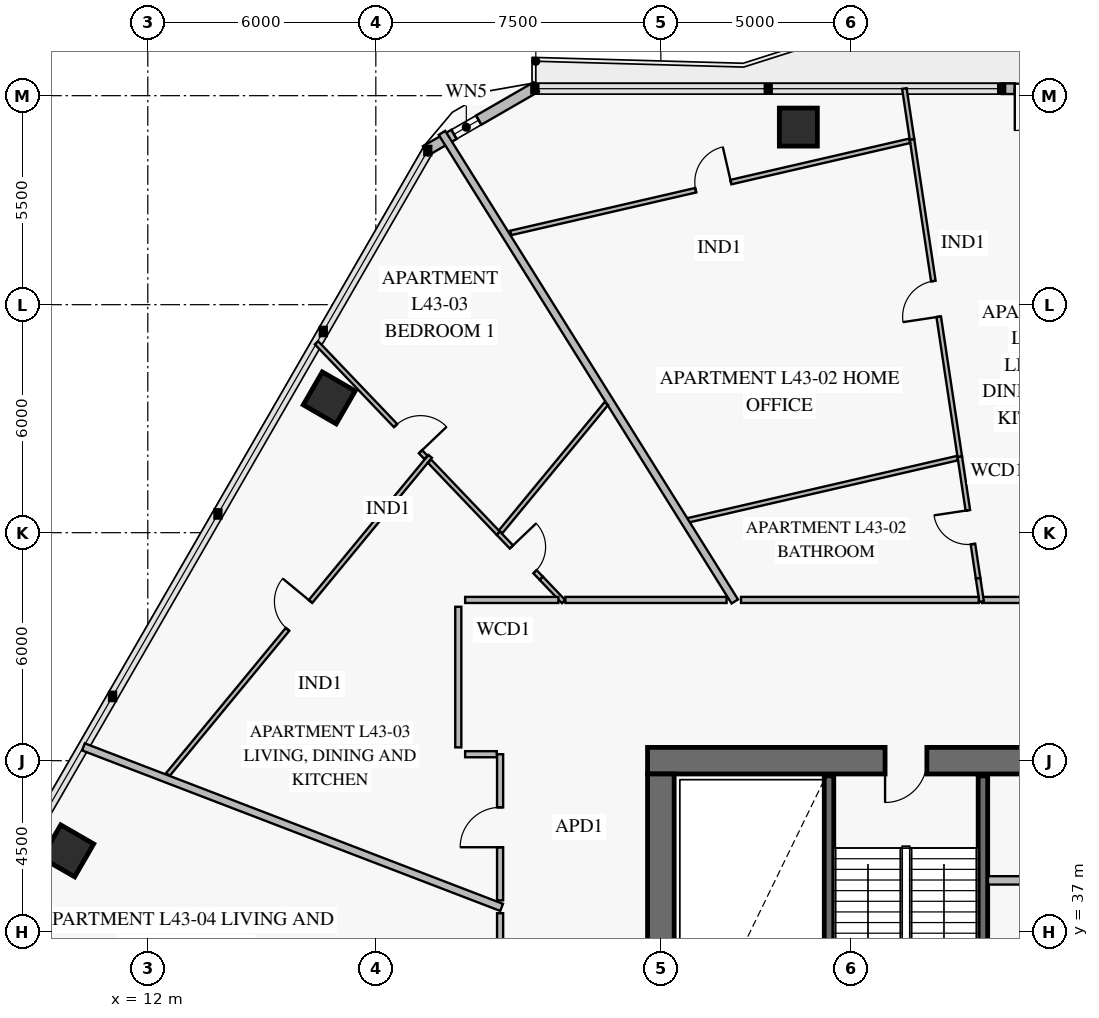
"""IFC4 building model, lengths in metres.
Left out: names, types, materials, properties, quantities, classifications, styles, units other than length and angle.
Written with IfcOpenShell. Run it as: python <this file> out.ifc"""

import sys

from ifc_helpers import new_model, si_unit, direction, frame, frame_2d, origin, origin_2d, place, context, subcontext, project, spatial, rectangle, extrude, element, fill, save


model = new_model("IFC4")
c1 = context("Model", 3, precision=1e-05, world=origin(), true_north=direction((0.0, 1.0)))
c2 = subcontext(c1, "Body", "Model", "MODEL_VIEW")
j1 = project(units=[si_unit("LENGTHUNIT", "METRE"), si_unit("PLANEANGLEUNIT", "RADIAN")], contexts=[c1])
p1 = place(None, origin())
s1 = spatial("IfcSite", under=j1, at=p1, CompositionType="ELEMENT")
p2 = place(p1, origin())
s2 = spatial("IfcBuilding", under=s1, at=p2, CompositionType="ELEMENT")
p3 = place(p2, frame((0.0, 0.0, 173.2)))
s3 = spatial("IfcBuildingStorey", under=s2, at=p3, CompositionType="ELEMENT", Elevation=173.2)
p4 = place(p3, frame((36.75, 41.5, 0.0), z_axis=(0.0, 0.0, 1.0), x_axis=(-1.0, 0.0, 0.0)))
e1 = element("IfcWall", 1, at=p4, inside=s3, PredefinedType="SHEAR", context=c2, shape_type="SweptSolid", body=[
    extrude(rectangle(XDim=11.6, YDim=0.7, at=frame_2d((5.8, 0.0))), origin(), (0.0, 0.0, 1.0), 3.8),
])
p5 = place(p4, frame((4.25, 0.0, 0.0)))
e2 = element("IfcOpeningElement", 2, at=p5, cuts=e1, PredefinedType="OPENING", context=c2, shape_type="SweptSolid", body=[
    extrude(rectangle(XDim=1.1, YDim=2.15, at=frame_2d((0.55, 1.075))), frame((0.0, 0.362, 0.0), z_axis=(0.0, -1.0, 0.0), x_axis=(1.0, 0.0, 0.0)), (0.0, 0.0, 1.0), 0.724),
])
p6 = place(p3, frame((25.5, 22.85, 0.0), z_axis=(0.0, 0.0, 1.0), x_axis=(0.0, 1.0, 0.0)))
e3 = element("IfcWall", 3, at=p6, inside=s3, PredefinedType="SHEAR", context=c2, shape_type="SweptSolid", body=[
    extrude(rectangle(XDim=18.3, YDim=0.7, at=frame_2d((9.15, 0.0))), origin(), (0.0, 0.0, 1.0), 3.8),
])
p7 = place(p6, frame((8.9, 0.0, 0.0)))
e4 = element("IfcOpeningElement", 4, at=p7, cuts=e3, PredefinedType="OPENING", context=c2, shape_type="SweptSolid", body=[
    extrude(rectangle(XDim=1.1, YDim=2.15, at=frame_2d((0.55, 1.075))), frame((0.0, 0.362, 0.0), z_axis=(0.0, -1.0, 0.0), x_axis=(1.0, 0.0, 0.0)), (0.0, 0.0, 1.0), 0.724),
])
for number, where, z_axis, x_axis in (
    (5, (29.118, 58.173, 0.0), (0.0, 0.0, 1.0), (-1.0, 0.0, 0.0)),
    (6, (16.774, 51.047, 0.0), (0.0, 0.0, 1.0), (-0.5, -0.866, 0.0)),
    (7, (9.892, 39.126, 0.0), (0.0, 0.0, 1.0), (-0.5, -0.866, 0.0)),
):
    element("IfcColumn", number, at=place(p3, frame(where, z_axis=z_axis, x_axis=x_axis)), inside=s3, PredefinedType="COLUMN", context=c2, shape_type="SweptSolid", body=[
        extrude(rectangle(XDim=1.0, YDim=1.0, at=origin_2d()), origin(), (0.0, 0.0, 1.0), 3.55),
    ])
p8 = place(p3, frame((19.307, 57.548, 0.0), z_axis=(0.0, 0.0, 1.0), x_axis=(0.866020068361, 0.500009241111, 0.0)))
e8 = element("IfcWall", 8, at=p8, inside=s3, PredefinedType="SOLIDWALL", context=c2, shape_type="SweptSolid", body=[
    extrude(rectangle(XDim=3.365, YDim=0.28, at=frame_2d((1.683, 0.0))), origin(), (0.0, 0.0, 1.0), 3.55),
])
p9 = place(p8, frame((0.866, 0.0, 0.85)))
e9 = element("IfcOpeningElement", 9, at=p9, cuts=e8, PredefinedType="OPENING", context=c2, shape_type="SweptSolid", body=[
    extrude(rectangle(XDim=0.75, YDim=1.5, at=frame_2d((0.375, 0.75))), frame((0.0, 0.152, 0.0), z_axis=(0.0, -1.0, 0.0), x_axis=(1.0, 0.0, 0.0)), (0.0, 0.0, 1.0), 0.304),
])
p10 = place(p3, frame((34.468, 59.183, 0.0), z_axis=(0.0, 0.0, 1.0), x_axis=(1.0, 0.0, 0.0)))
e10 = element("IfcWall", 10, at=p10, inside=s3, PredefinedType="SOLIDWALL", context=c2, shape_type="SweptSolid", body=[
    extrude(rectangle(XDim=1.79, YDim=0.28, at=frame_2d((0.895, 0.0))), origin(), (0.0, 0.0, 1.0), 3.55),
])
p11 = place(p10, frame((0.345, 0.0, 0.0)))
e11 = element("IfcOpeningElement", 11, at=p11, cuts=e10, PredefinedType="OPENING", context=c2, shape_type="SweptSolid", body=[
    extrude(rectangle(XDim=1.1, YDim=2.2, at=frame_2d((0.55, 1.1))), frame((0.0, 0.152, 0.0), z_axis=(0.0, -1.0, 0.0), x_axis=(1.0, 0.0, 0.0)), (0.0, 0.0, 1.0), 0.304),
])
for number, where, z_axis, x_axis in (
    (12, (29.925, 31.4, 0.0), (0.0, 0.0, 1.0), (0.0, 1.0, 0.0)),
    (13, (33.975, 31.4, 0.0), (0.0, 0.0, 1.0), (0.0, 1.0, 0.0)),
):
    element("IfcWall", number, at=place(p3, frame(where, z_axis=z_axis, x_axis=x_axis)), inside=s3, PredefinedType="SOLIDWALL", context=c2, shape_type="SweptSolid", body=[
        extrude(rectangle(XDim=9.7, YDim=0.25, at=frame_2d((4.85, 0.0))), origin(), (0.0, 0.0, 1.0), 3.8),
    ])
p12 = place(p3, frame((33.848, 46.3, 0.0), z_axis=(0.0, 0.0, 1.0), x_axis=(-0.148934116093, 0.988847121179, 0.0)))
e14 = element("IfcWall", 14, at=p12, inside=s3, PredefinedType="PARTITIONING", context=c2, shape_type="SweptSolid", body=[
    extrude(rectangle(XDim=3.238, YDim=0.12, at=frame_2d((1.619, 0.0))), origin(), (0.0, 0.0, 1.0), 3.55),
])
p13 = place(p12, frame((0.91, 0.0, 0.0)))
e15 = element("IfcOpeningElement", 15, at=p13, cuts=e14, PredefinedType="OPENING", context=c2, shape_type="SweptSolid", body=[
    extrude(rectangle(XDim=0.9, YDim=2.1, at=frame_2d((0.45, 1.05))), frame((0.0, 0.072, 0.0), z_axis=(0.0, -1.0, 0.0), x_axis=(1.0, 0.0, 0.0)), (0.0, 0.0, 1.0), 0.144),
])
p14 = place(p3, frame((33.365, 49.501, 0.0), z_axis=(0.0, 0.0, 1.0), x_axis=(-0.148816904755, 0.988864767731, 0.0)))
e16 = element("IfcWall", 16, at=p14, inside=s3, PredefinedType="PARTITIONING", context=c2, shape_type="SweptSolid", body=[
    extrude(rectangle(XDim=8.444, YDim=0.12, at=frame_2d((4.222, 0.0))), origin(), (0.0, 0.0, 1.0), 3.15),
])
p15 = place(p14, frame((3.722, 0.0, 0.0)))
e17 = element("IfcOpeningElement", 17, at=p15, cuts=e16, PredefinedType="OPENING", context=c2, shape_type="SweptSolid", body=[
    extrude(rectangle(XDim=0.95, YDim=2.1, at=frame_2d((0.475, 1.05))), frame((0.0, 0.072, 0.0), z_axis=(0.0, -1.0, 0.0), x_axis=(1.0, 0.0, 0.0)), (0.0, 0.0, 1.0), 0.144),
])
p16 = place(p3, frame((32.046, 57.811, 0.0), z_axis=(0.0, 0.0, 1.0), x_axis=(-0.974371328586, -0.22494558015, 0.0)))
e18 = element("IfcWall", 18, at=p16, inside=s3, PredefinedType="PARTITIONING", context=c2, shape_type="SweptSolid", body=[
    extrude(rectangle(XDim=10.772, YDim=0.12, at=frame_2d((5.386, 0.0))), origin(), (0.0, 0.0, 1.0), 2.87),
])
p17 = place(p16, frame((4.826, 0.0, 0.0)))
e19 = element("IfcOpeningElement", 19, at=p17, cuts=e18, PredefinedType="OPENING", context=c2, shape_type="SweptSolid", body=[
    extrude(rectangle(XDim=0.95, YDim=2.1, at=frame_2d((0.475, 1.05))), frame((0.0, 0.072, 0.0), z_axis=(0.0, -1.0, 0.0), x_axis=(1.0, 0.0, 0.0)), (0.0, 0.0, 1.0), 0.144),
])
p18 = place(p3, frame((37.302, 45.73, 0.0), z_axis=(0.0, 0.0, 1.0), x_axis=(-1.0, 0.0, 0.0)))
e20 = element("IfcWall", 20, at=p18, inside=s3, PredefinedType="PARTITIONING", context=c2, shape_type="SweptSolid", body=[
    extrude(rectangle(XDim=3.348, YDim=0.16, at=frame_2d((1.674, 0.0))), origin(), (0.0, 0.0, 1.0), 3.55),
])
p19 = place(p18, frame((1.149, 0.0, 0.0)))
e21 = element("IfcOpeningElement", 21, at=p19, cuts=e20, PredefinedType="OPENING", context=c2, shape_type="SweptSolid", body=[
    extrude(rectangle(XDim=1.05, YDim=2.15, at=frame_2d((0.525, 1.075))), frame((0.0, 0.092, 0.0), z_axis=(0.0, -1.0, 0.0), x_axis=(1.0, 0.0, 0.0)), (0.0, 0.0, 1.0), 0.184),
])
p20 = place(p3, frame((19.43, 49.509, 0.0), z_axis=(0.0, 0.0, 1.0), x_axis=(-0.636077930037, -0.771624822643, 0.0)))
e22 = element("IfcWall", 22, at=p20, inside=s3, PredefinedType="PARTITIONING", context=c2, shape_type="SweptSolid", body=[
    extrude(rectangle(XDim=10.848, YDim=0.12, at=frame_2d((5.424, 0.0))), origin(), (0.0, 0.0, 1.0), 2.9),
])
p21 = place(p20, frame((4.949, 0.0, 0.0)))
e23 = element("IfcOpeningElement", 23, at=p21, cuts=e22, PredefinedType="OPENING", context=c2, shape_type="SweptSolid", body=[
    extrude(rectangle(XDim=0.95, YDim=2.1, at=frame_2d((0.475, 1.05))), frame((0.0, 0.072, 0.0), z_axis=(0.0, -1.0, 0.0), x_axis=(1.0, 0.0, 0.0)), (0.0, 0.0, 1.0), 0.144),
])
p22 = place(p3, frame((22.354, 46.3, 0.0), z_axis=(0.0, 0.0, 1.0), x_axis=(-0.690394331583, 0.723433249801, 0.0)))
e24 = element("IfcWall", 24, at=p22, inside=s3, PredefinedType="PARTITIONING", context=c2, shape_type="SweptSolid", body=[
    extrude(rectangle(XDim=1.64, YDim=0.12, at=frame_2d((0.82, 0.0))), origin(), (0.0, 0.0, 1.0), 3.55),
])
p23 = place(p22, frame((0.239, 0.0, 0.0)))
e25 = element("IfcOpeningElement", 25, at=p23, cuts=e24, PredefinedType="OPENING", context=c2, shape_type="SweptSolid", body=[
    extrude(rectangle(XDim=0.9, YDim=2.1, at=frame_2d((0.45, 1.05))), frame((0.0, 0.072, 0.0), z_axis=(0.0, -1.0, 0.0), x_axis=(1.0, 0.0, 0.0)), (0.0, 0.0, 1.0), 0.144),
])
p24 = place(p3, frame((21.221, 47.487, 0.0), z_axis=(0.0, 0.0, 1.0), x_axis=(-0.690367102985, 0.723459233901, 0.0)))
e26 = element("IfcWall", 26, at=p24, inside=s3, PredefinedType="PARTITIONING", context=c2, shape_type="SweptSolid", body=[
    extrude(rectangle(XDim=2.619, YDim=0.12, at=frame_2d((1.31, 0.0))), origin(), (0.0, 0.0, 1.0), 3.55),
])
p25 = place(p3, frame((19.319, 49.481, 0.0), z_axis=(0.0, 0.0, 1.0), x_axis=(-0.690401934282, 0.723425994238, 0.0)))
e27 = element("IfcWall", 27, at=p25, inside=s3, PredefinedType="PARTITIONING", context=c2, shape_type="SweptSolid", body=[
    extrude(rectangle(XDim=4.169, YDim=0.12, at=frame_2d((2.085, 0.0))), origin(), (0.0, 0.0, 1.0), 2.87),
])
p26 = place(p25, frame((0.207, 0.0, 0.0)))
e28 = element("IfcOpeningElement", 28, at=p26, cuts=e27, PredefinedType="OPENING", context=c2, shape_type="SweptSolid", body=[
    extrude(rectangle(XDim=0.95, YDim=2.1, at=frame_2d((0.475, 1.05))), frame((0.0, 0.072, 0.0), z_axis=(0.0, -1.0, 0.0), x_axis=(1.0, 0.0, 0.0)), (0.0, 0.0, 1.0), 0.144),
])
p27 = place(p3, frame((21.27, 41.67, 0.0), z_axis=(0.0, 0.0, 1.0), x_axis=(0.0, -1.0, 0.0)))
e29 = element("IfcWall", 29, at=p27, inside=s3, PredefinedType="PARTITIONING", context=c2, shape_type="SweptSolid", body=[
    extrude(rectangle(XDim=3.846, YDim=0.16, at=frame_2d((1.923, 0.0))), origin(), (0.0, 0.0, 1.0), 3.55),
])
p28 = place(p27, frame((1.398, 0.0, 0.0)))
e30 = element("IfcOpeningElement", 30, at=p28, cuts=e29, PredefinedType="OPENING", context=c2, shape_type="SweptSolid", body=[
    extrude(rectangle(XDim=1.05, YDim=2.15, at=frame_2d((0.525, 1.075))), frame((0.0, 0.092, 0.0), z_axis=(0.0, -1.0, 0.0), x_axis=(1.0, 0.0, 0.0)), (0.0, 0.0, 1.0), 0.184),
])
p29 = place(p3, frame((21.27, 37.486, 0.0), z_axis=(0.0, 0.0, 1.0), x_axis=(0.0, -1.0, 0.0)))
e31 = element("IfcWall", 31, at=p29, inside=s3, PredefinedType="PARTITIONING", context=c2, shape_type="SweptSolid", body=[
    extrude(rectangle(XDim=3.348, YDim=0.16, at=frame_2d((1.674, 0.0))), origin(), (0.0, 0.0, 1.0), 2.9),
])
p30 = place(p29, frame((1.149, 0.0, 0.0)))
e32 = element("IfcOpeningElement", 32, at=p30, cuts=e31, PredefinedType="OPENING", context=c2, shape_type="SweptSolid", body=[
    extrude(rectangle(XDim=1.05, YDim=2.15, at=frame_2d((0.525, 1.075))), frame((0.0, 0.092, 0.0), z_axis=(0.0, -1.0, 0.0), x_axis=(1.0, 0.0, 0.0)), (0.0, 0.0, 1.0), 0.184),
])
p31 = place(p3, frame((34.108, 38.35, 0.0), z_axis=(0.0, 0.0, 1.0), x_axis=(1.0, 0.0, 0.0)))
e33 = element("IfcWall", 33, at=p31, inside=s3, PredefinedType="PARTITIONING", context=c2, shape_type="SweptSolid", body=[
    extrude(rectangle(XDim=2.084, YDim=0.22, at=frame_2d((1.042, 0.0))), origin(), (0.0, 0.0, 1.0), 3.55),
])
p32 = place(p3, frame((33.94, 45.685, 0.0), z_axis=(0.0, 0.0, 1.0), x_axis=(-0.148839731884, 0.988861332146, 0.0)))
e34 = element("IfcWall", 34, at=p32, inside=s3, PredefinedType="PARTITIONING", context=c2, shape_type="SweptSolid", body=[
    extrude(rectangle(XDim=0.622, YDim=0.12, at=frame_2d((0.311, 0.0))), origin(), (0.0, 0.0, 1.0), 3.55),
])
p33 = place(p3, frame((32.109, 57.851, 0.0), z_axis=(0.0, 0.0, 1.0), x_axis=(-0.148826194804, 0.988863369602, 0.0)))
e35 = element("IfcWall", 35, at=p33, inside=s3, PredefinedType="PARTITIONING", context=c2, shape_type="SweptSolid", body=[
    extrude(rectangle(XDim=1.352, YDim=0.12, at=frame_2d((0.676, 0.0))), origin(), (0.0, 0.0, 1.0), 2.87),
])
p34 = place(p3, frame((33.303, 49.461, 0.0), z_axis=(0.0, 0.0, 1.0), x_axis=(-0.97437372251, -0.224935210409, 0.0)))
e36 = element("IfcWall", 36, at=p34, inside=s3, PredefinedType="PARTITIONING", context=c2, shape_type="SweptSolid", body=[
    extrude(rectangle(XDim=7.301, YDim=0.12, at=frame_2d((3.651, 0.0))), origin(), (0.0, 0.0, 1.0), 2.9),
])
p35 = place(p3, frame((27.446, 45.69, 0.0), z_axis=(0.0, 0.0, 1.0), x_axis=(-0.529915927037, 0.848050181459, 0.0)))
e37 = element("IfcWall", 37, at=p35, inside=s3, PredefinedType="PARTITIONING", context=c2, shape_type="SweptSolid", body=[
    extrude(rectangle(XDim=14.54, YDim=0.2, at=frame_2d((7.27, 0.0))), origin(), (0.0, 0.0, 1.0), 2.87),
])
p36 = place(p3, frame((22.941, 45.685, 0.0), z_axis=(0.0, 0.0, 1.0), x_axis=(-0.690400608296, 0.723427259691, 0.0)))
e38 = element("IfcWall", 38, at=p36, inside=s3, PredefinedType="PARTITIONING", context=c2, shape_type="SweptSolid", body=[
    extrude(rectangle(XDim=0.85, YDim=0.12, at=frame_2d((0.425, 0.0))), origin(), (0.0, 0.0, 1.0), 3.55),
])
p37 = place(p3, frame((24.065, 50.897, 0.0), z_axis=(0.0, 0.0, 1.0), x_axis=(-0.636096479455, -0.771609531321, 0.0)))
e39 = element("IfcWall", 39, at=p37, inside=s3, PredefinedType="PARTITIONING", context=c2, shape_type="SweptSolid", body=[
    extrude(rectangle(XDim=4.374, YDim=0.12, at=frame_2d((2.187, 0.0))), origin(), (0.0, 0.0, 1.0), 3.55),
])
p38 = place(p3, frame((21.31, 37.639, 0.0), z_axis=(0.0, 0.0, 1.0), x_axis=(-0.93357709865, 0.358376618762, 0.0)))
e40 = element("IfcWall", 40, at=p38, inside=s3, PredefinedType="PARTITIONING", context=c2, shape_type="SweptSolid", body=[
    extrude(rectangle(XDim=11.787, YDim=0.2, at=frame_2d((5.894, 0.0))), origin(), (0.0, 0.0, 1.0), 2.87),
])
p39 = place(p3, frame((33.865, 45.73, 0.0), z_axis=(0.0, 0.0, 1.0), x_axis=(-1.0, 0.0, 0.0)))
e41 = element("IfcWall", 41, at=p39, inside=s3, PredefinedType="PARTITIONING", context=c2, shape_type="SweptSolid", body=[
    extrude(rectangle(XDim=6.255, YDim=0.16, at=frame_2d((3.127, 0.0))), origin(), (0.0, 0.0, 1.0), 2.9),
])
p40 = place(p3, frame((20.17, 45.55, 0.0), z_axis=(0.0, 0.0, 1.0), x_axis=(0.0, -1.0, 0.0)))
e42 = element("IfcWall", 42, at=p40, inside=s3, PredefinedType="PARTITIONING", context=c2, shape_type="SweptSolid", body=[
    extrude(rectangle(XDim=3.7, YDim=0.16, at=frame_2d((1.85, 0.0))), origin(), (0.0, 0.0, 1.0), 3.15),
])
p41 = place(p3, frame((22.804, 45.73, 0.0), z_axis=(0.0, 0.0, 1.0), x_axis=(-1.0, 0.0, 0.0)))
e43 = element("IfcWall", 43, at=p41, inside=s3, PredefinedType="PARTITIONING", context=c2, shape_type="SweptSolid", body=[
    extrude(rectangle(XDim=2.454, YDim=0.16, at=frame_2d((1.227, 0.0))), origin(), (0.0, 0.0, 1.0), 2.9),
])
p42 = place(p3, frame((20.35, 41.67, 0.0), z_axis=(0.0, 0.0, 1.0), x_axis=(1.0, 0.0, 0.0)))
e44 = element("IfcWall", 44, at=p42, inside=s3, PredefinedType="PARTITIONING", context=c2, shape_type="SweptSolid", body=[
    extrude(rectangle(XDim=0.832, YDim=0.16, at=frame_2d((0.416, 0.0))), origin(), (0.0, 0.0, 1.0), 3.55),
])
p43 = place(p3, frame((27.229, 45.73, 0.0), z_axis=(0.0, 0.0, 1.0), x_axis=(-1.0, 0.0, 0.0)))
e45 = element("IfcWall", 45, at=p43, inside=s3, PredefinedType="PARTITIONING", context=c2, shape_type="SweptSolid", body=[
    extrude(rectangle(XDim=4.241, YDim=0.16, at=frame_2d((2.121, 0.0))), origin(), (0.0, 0.0, 1.0), 3.55),
])
p44 = place(p9, origin())
e46 = element("IfcWindow", 46, at=p44, inside=s3, PartitioningType="SINGLE_PANEL", PredefinedType="WINDOW", context=c2, shape_type="SweptSolid", body=[
    extrude(rectangle(XDim=0.75, YDim=1.5, at=frame_2d((0.375, 0.75))), frame((0.0, 0.03, 0.0), z_axis=(0.0, -1.0, 0.0), x_axis=(1.0, 0.0, 0.0)), (0.0, 0.0, 1.0), 0.06),
])
fill(e9, e46)
p45 = place(p11, frame((1.1, 0.0, 0.0), z_axis=(0.0, 0.0, 1.0), x_axis=(-1.0, 0.0, 0.0)))
e47 = element("IfcDoor", 47, at=p45, inside=s3, OperationType="SINGLE_SWING_RIGHT", PredefinedType="DOOR", context=c2, shape_type="SweptSolid", body=[
    extrude(rectangle(XDim=1.1, YDim=2.2, at=frame_2d((0.55, 1.1))), frame((0.0, 0.025, 0.0), z_axis=(0.0, -1.0, 0.0), x_axis=(1.0, 0.0, 0.0)), (0.0, 0.0, 1.0), 0.05),
])
fill(e11, e47)
p46 = place(p5, origin())
e48 = element("IfcDoor", 48, at=p46, inside=s3, OperationType="SINGLE_SWING_RIGHT", PredefinedType="USERDEFINED", context=c2, shape_type="SweptSolid", body=[
    extrude(rectangle(XDim=1.1, YDim=2.15, at=frame_2d((0.55, 1.075))), frame((0.0, 0.025, 0.0), z_axis=(0.0, -1.0, 0.0), x_axis=(1.0, 0.0, 0.0)), (0.0, 0.0, 1.0), 0.05),
])
fill(e2, e48)
p47 = place(p13, origin())
e49 = element("IfcDoor", 49, at=p47, inside=s3, OperationType="SINGLE_SWING_RIGHT", PredefinedType="DOOR", context=c2, shape_type="SweptSolid", body=[
    extrude(rectangle(XDim=0.9, YDim=2.1, at=frame_2d((0.45, 1.05))), frame((0.0, 0.025, 0.0), z_axis=(0.0, -1.0, 0.0), x_axis=(1.0, 0.0, 0.0)), (0.0, 0.0, 1.0), 0.05),
])
fill(e15, e49)
p48 = place(p15, origin())
e50 = element("IfcDoor", 50, at=p48, inside=s3, OperationType="SINGLE_SWING_LEFT", PredefinedType="DOOR", context=c2, shape_type="SweptSolid", body=[
    extrude(rectangle(XDim=0.95, YDim=2.1, at=frame_2d((0.475, 1.05))), frame((0.0, 0.025, 0.0), z_axis=(0.0, -1.0, 0.0), x_axis=(1.0, 0.0, 0.0)), (0.0, 0.0, 1.0), 0.05),
])
fill(e17, e50)
p49 = place(p17, frame((0.95, 0.0, 0.0), z_axis=(0.0, 0.0, 1.0), x_axis=(-1.0, 0.0, 0.0)))
e51 = element("IfcDoor", 51, at=p49, inside=s3, OperationType="SINGLE_SWING_RIGHT", PredefinedType="DOOR", context=c2, shape_type="SweptSolid", body=[
    extrude(rectangle(XDim=0.95, YDim=2.1, at=frame_2d((0.475, 1.05))), frame((0.0, 0.025, 0.0), z_axis=(0.0, -1.0, 0.0), x_axis=(1.0, 0.0, 0.0)), (0.0, 0.0, 1.0), 0.05),
])
fill(e19, e51)
p50 = place(p21, frame((0.95, 0.0, 0.0), z_axis=(0.0, 0.0, 1.0), x_axis=(-1.0, 0.0, 0.0)))
e52 = element("IfcDoor", 52, at=p50, inside=s3, OperationType="SINGLE_SWING_RIGHT", PredefinedType="DOOR", context=c2, shape_type="SweptSolid", body=[
    extrude(rectangle(XDim=0.95, YDim=2.1, at=frame_2d((0.475, 1.05))), frame((0.0, 0.025, 0.0), z_axis=(0.0, -1.0, 0.0), x_axis=(1.0, 0.0, 0.0)), (0.0, 0.0, 1.0), 0.05),
])
fill(e23, e52)
p51 = place(p23, frame((0.9, 0.0, 0.0), z_axis=(0.0, 0.0, 1.0), x_axis=(-1.0, 0.0, 0.0)))
e53 = element("IfcDoor", 53, at=p51, inside=s3, OperationType="SINGLE_SWING_LEFT", PredefinedType="DOOR", context=c2, shape_type="SweptSolid", body=[
    extrude(rectangle(XDim=0.9, YDim=2.1, at=frame_2d((0.45, 1.05))), frame((0.0, 0.025, 0.0), z_axis=(0.0, -1.0, 0.0), x_axis=(1.0, 0.0, 0.0)), (0.0, 0.0, 1.0), 0.05),
])
fill(e25, e53)
p52 = place(p26, frame((0.95, 0.0, 0.0), z_axis=(0.0, 0.0, 1.0), x_axis=(-1.0, 0.0, 0.0)))
e54 = element("IfcDoor", 54, at=p52, inside=s3, OperationType="SINGLE_SWING_RIGHT", PredefinedType="DOOR", context=c2, shape_type="SweptSolid", body=[
    extrude(rectangle(XDim=0.95, YDim=2.1, at=frame_2d((0.475, 1.05))), frame((0.0, 0.025, 0.0), z_axis=(0.0, -1.0, 0.0), x_axis=(1.0, 0.0, 0.0)), (0.0, 0.0, 1.0), 0.05),
])
fill(e28, e54)
p53 = place(p28, frame((1.05, 0.0, 0.0), z_axis=(0.0, 0.0, 1.0), x_axis=(-1.0, 0.0, 0.0)))
e55 = element("IfcDoor", 55, at=p53, inside=s3, OperationType="SINGLE_SWING_LEFT", PredefinedType="DOOR", context=c2, shape_type="SweptSolid", body=[
    extrude(rectangle(XDim=1.05, YDim=2.15, at=frame_2d((0.525, 1.075))), frame((0.0, 0.025, 0.0), z_axis=(0.0, -1.0, 0.0), x_axis=(1.0, 0.0, 0.0)), (0.0, 0.0, 1.0), 0.05),
])
fill(e30, e55)
save(model, sys.argv[1])
